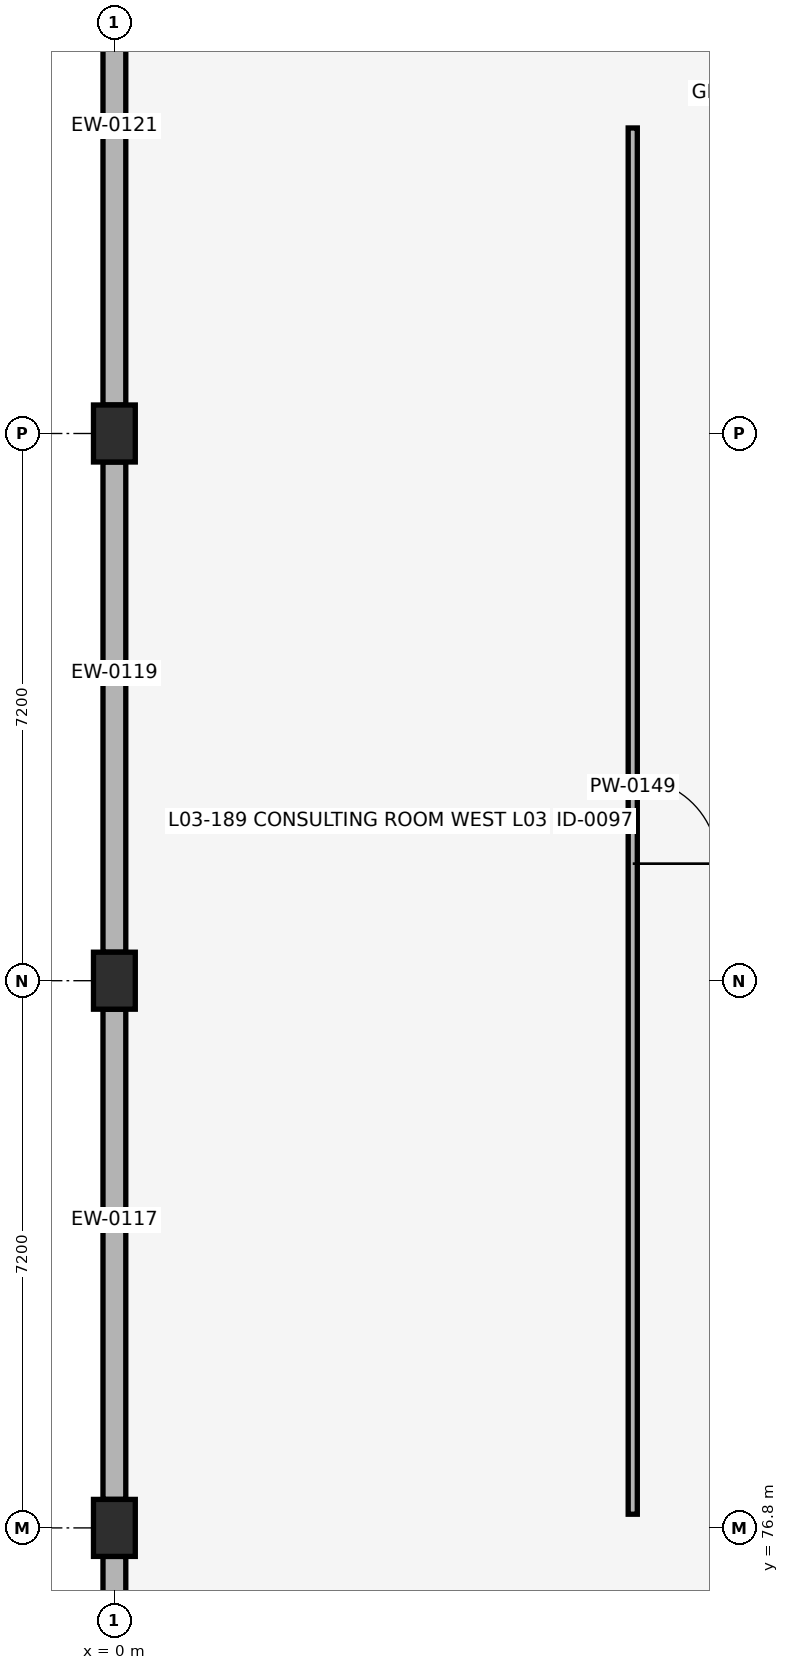
"""IFC4 building model, lengths in metres.
Left out: names, types, materials, properties, quantities, classifications, styles, units other than length and angle.
Written with IfcOpenShell. Run it as: python <this file> out.ifc"""

import sys

from ifc_helpers import new_model, si_unit, direction, frame, frame_2d, origin, origin_2d, place, context, subcontext, project, spatial, rectangle, extrude, element, fill, save


model = new_model("IFC4")
c1 = context("Model", 3, precision=1e-05, world=origin(), true_north=direction((0.0, 1.0)))
c2 = subcontext(c1, "Body", "Model", "MODEL_VIEW")
j1 = project(units=[si_unit("LENGTHUNIT", "METRE"), si_unit("PLANEANGLEUNIT", "RADIAN")], contexts=[c1])
p1 = place(None, origin())
s1 = spatial("IfcSite", under=j1, at=p1, CompositionType="ELEMENT")
p2 = place(p1, origin())
s2 = spatial("IfcBuilding", under=s1, at=p2, CompositionType="ELEMENT")
p3 = place(p2, frame((0.0, 0.0, 12.58)))
s3 = spatial("IfcBuildingStorey", under=s2, at=p3, CompositionType="ELEMENT", Elevation=12.58)
for number, where, z_axis, x_axis in (
    (1, (0.0, 76.8, 0.0), (0.0, 0.0, 1.0), (1.0, 0.0, 0.0)),
    (2, (0.0, 84.0, 0.0), (0.0, 0.0, 1.0), (1.0, 0.0, 0.0)),
    (3, (0.0, 91.2, 0.0), (0.0, 0.0, 1.0), (1.0, 0.0, 0.0)),
):
    element("IfcColumn", number, at=place(p3, frame(where, z_axis=z_axis, x_axis=x_axis)), inside=s3, PredefinedType="COLUMN", context=c2, shape_type="SweptSolid", body=[
        extrude(rectangle(XDim=0.55, YDim=0.75, at=origin_2d()), origin(), (0.0, 0.0, 1.0), 4.08),
    ])
p4 = place(p3, frame((0.0, 76.425, 0.0), z_axis=(0.0, 0.0, 1.0), x_axis=(0.0, -1.0, 0.0)))
e4 = element("IfcWall", 4, at=p4, inside=s3, PredefinedType="SOLIDWALL", context=c2, shape_type="SweptSolid", body=[
    extrude(rectangle(XDim=6.45, YDim=0.3, at=frame_2d((3.225, 0.0))), origin(), (0.0, 0.0, 1.0), 3.05),
])
for number, where, z_axis, x_axis in (
    (5, (0.0, 83.625, 0.0), (0.0, 0.0, 1.0), (0.0, -1.0, 0.0)),
    (6, (0.0, 90.825, 0.0), (0.0, 0.0, 1.0), (0.0, -1.0, 0.0)),
    (7, (0.0, 98.025, 0.0), (0.0, 0.0, 1.0), (0.0, -1.0, 0.0)),
):
    element("IfcWall", number, at=place(p3, frame(where, z_axis=z_axis, x_axis=x_axis)), inside=s3, PredefinedType="SOLIDWALL", context=c2, shape_type="SweptSolid", body=[
        extrude(rectangle(XDim=6.45, YDim=0.3, at=frame_2d((3.225, 0.0))), origin(), (0.0, 0.0, 1.0), 3.08),
    ])
p5 = place(p3, frame((6.82, 76.98, 0.0), z_axis=(0.0, 0.0, 1.0), x_axis=(0.0, 1.0, 0.0)))
e8 = element("IfcWall", 8, at=p5, inside=s3, PredefinedType="PARTITIONING", context=c2, shape_type="SweptSolid", body=[
    extrude(rectangle(XDim=18.24, YDim=0.12, at=frame_2d((9.12, 0.0))), origin(), (0.0, 0.0, 1.0), 3.05),
])
p6 = place(p5, frame((8.56, 0.0, 0.0)))
e9 = element("IfcOpeningElement", 9, at=p6, cuts=e8, PredefinedType="OPENING", context=c2, shape_type="SweptSolid", body=[
    extrude(rectangle(XDim=1.12, YDim=2.1, at=frame_2d((0.56, 1.05))), frame((0.0, 0.07, 0.0), z_axis=(0.0, -1.0, 0.0), x_axis=(1.0, 0.0, 0.0)), (0.0, 0.0, 1.0), 0.14),
])
p7 = place(p6, origin())
e10 = element("IfcDoor", 10, at=p7, inside=s3, OperationType="SINGLE_SWING_RIGHT", PredefinedType="DOOR", context=c2, shape_type="SweptSolid", body=[
    extrude(rectangle(XDim=1.12, YDim=2.1, at=frame_2d((0.56, 1.05))), frame((0.0, 0.025, 0.0), z_axis=(0.0, -1.0, 0.0), x_axis=(1.0, 0.0, 0.0)), (0.0, 0.0, 1.0), 0.05),
])
fill(e9, e10)
save(model, sys.argv[1])
